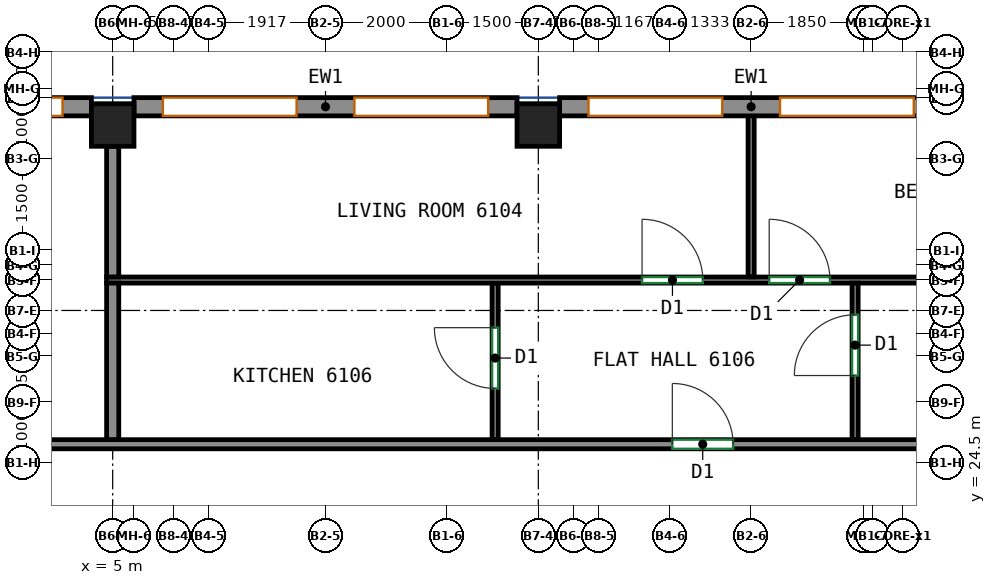
"""IFC4 building model, lengths in metres.
Left out: names, types, materials, properties, quantities, classifications, styles, units other than length and angle.
Written with IfcOpenShell. Run it as: python <this file> out.ifc"""

import sys

from ifc_helpers import new_model, si_unit, direction, frame, frame_2d, origin, origin_2d, place, context, subcontext, project, spatial, rectangle, extrude, source, transform, mapped, element, fill, save


model = new_model("IFC4")
c1 = context("Model", 3, precision=1e-05, world=origin(), true_north=direction((0.0, 1.0)))
c2 = subcontext(c1, "Body", "Model", "MODEL_VIEW")
j1 = project(units=[si_unit("LENGTHUNIT", "METRE"), si_unit("PLANEANGLEUNIT", "RADIAN")], contexts=[c1])
p1 = place(None, origin())
s1 = spatial("IfcSite", under=j1, at=p1, CompositionType="ELEMENT")
p2 = place(p1, origin())
s2 = spatial("IfcBuilding", under=s1, at=p2, CompositionType="ELEMENT")
p3 = place(p2, frame((0.0, 0.0, 252.6)))
s3 = spatial("IfcBuildingStorey", under=s2, at=p3, CompositionType="ELEMENT", Elevation=252.6)
m1 = source(origin(), c2, "Body", "SweptSolid", [
    extrude(rectangle(XDim=0.7, YDim=0.7, at=origin_2d()), origin(), (0.0, 0.0, 1.0), 3.12),
])
for number, where, z_axis, x_axis in (
    (1, (5.0, 30.05, 0.0), (0.0, 0.0, 1.0), (1.0, 0.0, 0.0)),
    (2, (12.0, 30.05, 0.0), (0.0, 0.0, 1.0), (1.0, 0.0, 0.0)),
):
    element("IfcColumn", number, at=place(p3, frame(where, z_axis=z_axis, x_axis=x_axis)), inside=s3, PredefinedType="COLUMN", context=c2, shape_type="MappedRepresentation", body=[
        mapped(m1, transform((0.0, 0.0, 0.0))),
    ])
m2 = source(origin(), c2, "Body", "SweptSolid", [
    extrude(rectangle(XDim=6.3, YDim=0.3, at=frame_2d((3.15, 0.0))), origin(), (0.0, 0.0, 1.0), 3.12),
])
p4 = place(p3, frame((18.65, 30.35, 0.0), z_axis=(0.0, 0.0, 1.0), x_axis=(-1.0, 0.0, 0.0)))
e3 = element("IfcWall", 3, at=p4, inside=s3, PredefinedType="SOLIDWALL", context=c2, shape_type="MappedRepresentation", body=[
    mapped(m2, transform((0.0, 0.0, 0.0))),
])
p5 = place(p4, frame((0.475, 0.0, 0.8)))
e4 = element("IfcOpeningElement", 4, at=p5, cuts=e3, PredefinedType="OPENING", context=c2, shape_type="SweptSolid", body=[
    extrude(rectangle(XDim=2.2, YDim=2.05, at=frame_2d((1.1, 1.025))), frame((0.0, 0.16, 0.0), z_axis=(0.0, -1.0, 0.0), x_axis=(1.0, 0.0, 0.0)), (0.0, 0.0, 1.0), 0.32),
])
p6 = place(p4, frame((3.625, 0.0, 0.8)))
e5 = element("IfcOpeningElement", 5, at=p6, cuts=e3, PredefinedType="OPENING", context=c2, shape_type="SweptSolid", body=[
    extrude(rectangle(XDim=2.2, YDim=2.05, at=frame_2d((1.1, 1.025))), frame((0.0, 0.16, 0.0), z_axis=(0.0, -1.0, 0.0), x_axis=(1.0, 0.0, 0.0)), (0.0, 0.0, 1.0), 0.32),
])
p7 = place(p3, frame((11.65, 30.35, 0.0), z_axis=(0.0, 0.0, 1.0), x_axis=(-1.0, 0.0, 0.0)))
e6 = element("IfcWall", 6, at=p7, inside=s3, PredefinedType="SOLIDWALL", context=c2, shape_type="MappedRepresentation", body=[
    mapped(m2, transform((0.0, 0.0, 0.0))),
])
p8 = place(p7, frame((0.475, 0.0, 0.8)))
e7 = element("IfcOpeningElement", 7, at=p8, cuts=e6, PredefinedType="OPENING", context=c2, shape_type="SweptSolid", body=[
    extrude(rectangle(XDim=2.2, YDim=2.05, at=frame_2d((1.1, 1.025))), frame((0.0, 0.16, 0.0), z_axis=(0.0, -1.0, 0.0), x_axis=(1.0, 0.0, 0.0)), (0.0, 0.0, 1.0), 0.32),
])
p9 = place(p7, frame((3.625, 0.0, 0.8)))
e8 = element("IfcOpeningElement", 8, at=p9, cuts=e6, PredefinedType="OPENING", context=c2, shape_type="SweptSolid", body=[
    extrude(rectangle(XDim=2.2, YDim=2.05, at=frame_2d((1.1, 1.025))), frame((0.0, 0.16, 0.0), z_axis=(0.0, -1.0, 0.0), x_axis=(1.0, 0.0, 0.0)), (0.0, 0.0, 1.0), 0.32),
])
p10 = place(p3, frame((4.65, 30.35, 0.0), z_axis=(0.0, 0.0, 1.0), x_axis=(-1.0, 0.0, 0.0)))
e9 = element("IfcWall", 9, at=p10, inside=s3, PredefinedType="SOLIDWALL", context=c2, shape_type="MappedRepresentation", body=[
    mapped(m2, transform((0.0, 0.0, 0.0))),
])
p11 = place(p10, frame((0.475, 0.0, 0.8)))
e10 = element("IfcOpeningElement", 10, at=p11, cuts=e9, PredefinedType="OPENING", context=c2, shape_type="SweptSolid", body=[
    extrude(rectangle(XDim=2.2, YDim=2.05, at=frame_2d((1.1, 1.025))), frame((0.0, 0.16, 0.0), z_axis=(0.0, -1.0, 0.0), x_axis=(1.0, 0.0, 0.0)), (0.0, 0.0, 1.0), 0.32),
])
p12 = place(p10, frame((3.625, 0.0, 0.8)))
e11 = element("IfcOpeningElement", 11, at=p12, cuts=e9, PredefinedType="OPENING", context=c2, shape_type="SweptSolid", body=[
    extrude(rectangle(XDim=2.2, YDim=2.05, at=frame_2d((1.1, 1.025))), frame((0.0, 0.16, 0.0), z_axis=(0.0, -1.0, 0.0), x_axis=(1.0, 0.0, 0.0)), (0.0, 0.0, 1.0), 0.32),
])
p13 = place(p3, frame((-16.075, 24.8, 0.0), z_axis=(0.0, 0.0, 1.0), x_axis=(1.0, 0.0, 0.0)))
e12 = element("IfcWall", 12, at=p13, inside=s3, PredefinedType="PARTITIONING", context=c2, shape_type="SweptSolid", body=[
    extrude(rectangle(XDim=36.073, YDim=0.15, at=frame_2d((18.037, 0.0))), origin(), (0.0, 0.0, 1.0), 3.12),
])
p14 = place(p13, frame((16.771, 0.0, 0.0)))
e13 = element("IfcOpeningElement", 13, at=p14, cuts=e12, PredefinedType="OPENING", context=c2, shape_type="SweptSolid", body=[
    extrude(rectangle(XDim=0.9, YDim=2.1, at=frame_2d((0.45, 1.05))), frame((0.0, 0.085, 0.0), z_axis=(0.0, -1.0, 0.0), x_axis=(1.0, 0.0, 0.0)), (0.0, 0.0, 1.0), 0.17),
])
p15 = place(p13, frame((30.279, 0.0, 0.0)))
e14 = element("IfcOpeningElement", 14, at=p15, cuts=e12, PredefinedType="OPENING", context=c2, shape_type="SweptSolid", body=[
    extrude(rectangle(XDim=1.0, YDim=2.1, at=frame_2d((0.5, 1.05))), frame((0.0, 0.085, 0.0), z_axis=(0.0, -1.0, 0.0), x_axis=(1.0, 0.0, 0.0)), (0.0, 0.0, 1.0), 0.17),
])
p16 = place(p3, frame((11.29, 24.877, 0.0), z_axis=(0.0, 0.0, 1.0), x_axis=(0.0, 1.0, 0.0)))
e15 = element("IfcWall", 15, at=p16, inside=s3, PredefinedType="PARTITIONING", context=c2, shape_type="SweptSolid", body=[
    extrude(rectangle(XDim=2.573, YDim=0.1, at=frame_2d((1.287, 0.0))), origin(), (0.0, 0.0, 1.0), 3.12),
])
p17 = place(p16, frame((0.84, 0.0, 0.0)))
e16 = element("IfcOpeningElement", 16, at=p17, cuts=e15, PredefinedType="OPENING", context=c2, shape_type="SweptSolid", body=[
    extrude(rectangle(XDim=1.0, YDim=2.1, at=frame_2d((0.5, 1.05))), frame((0.0, 0.06, 0.0), z_axis=(0.0, -1.0, 0.0), x_axis=(1.0, 0.0, 0.0)), (0.0, 0.0, 1.0), 0.12),
])
p18 = place(p3, frame((4.9, 27.5, 0.0), z_axis=(0.0, 0.0, 1.0), x_axis=(1.0, 0.0, 0.0)))
e17 = element("IfcWall", 17, at=p18, inside=s3, PredefinedType="PARTITIONING", context=c2, shape_type="SweptSolid", body=[
    extrude(rectangle(XDim=17.798, YDim=0.1, at=frame_2d((8.899, 0.0))), origin(), (0.0, 0.0, 1.0), 3.12),
])
p19 = place(p18, frame((8.806, 0.0, 0.0)))
e18 = element("IfcOpeningElement", 18, at=p19, cuts=e17, PredefinedType="OPENING", context=c2, shape_type="SweptSolid", body=[
    extrude(rectangle(XDim=1.0, YDim=2.1, at=frame_2d((0.5, 1.05))), frame((0.0, 0.06, 0.0), z_axis=(0.0, -1.0, 0.0), x_axis=(1.0, 0.0, 0.0)), (0.0, 0.0, 1.0), 0.12),
])
p20 = place(p18, frame((10.897, 0.0, 0.0)))
e19 = element("IfcOpeningElement", 19, at=p20, cuts=e17, PredefinedType="OPENING", context=c2, shape_type="SweptSolid", body=[
    extrude(rectangle(XDim=1.0, YDim=2.1, at=frame_2d((0.5, 1.05))), frame((0.0, 0.06, 0.0), z_axis=(0.0, -1.0, 0.0), x_axis=(1.0, 0.0, 0.0)), (0.0, 0.0, 1.0), 0.12),
])
p21 = place(p3, frame((5.0, 24.877, 0.0), z_axis=(0.0, 0.0, 1.0), x_axis=(0.0, 1.0, 0.0)))
e20 = element("IfcWall", 20, at=p21, inside=s3, PredefinedType="PARTITIONING", context=c2, shape_type="SweptSolid", body=[
    extrude(rectangle(XDim=2.573, YDim=0.2, at=frame_2d((1.287, 0.0))), origin(), (0.0, 0.0, 1.0), 3.12),
])
p22 = place(p3, frame((17.21, 24.877, 0.0), z_axis=(0.0, 0.0, 1.0), x_axis=(0.0, 1.0, 0.0)))
e21 = element("IfcWall", 21, at=p22, inside=s3, PredefinedType="PARTITIONING", context=c2, shape_type="SweptSolid", body=[
    extrude(rectangle(XDim=2.573, YDim=0.1, at=frame_2d((1.287, 0.0))), origin(), (0.0, 0.0, 1.0), 3.12),
])
p23 = place(p22, frame((1.053, 0.0, 0.0)))
e22 = element("IfcOpeningElement", 22, at=p23, cuts=e21, PredefinedType="OPENING", context=c2, shape_type="SweptSolid", body=[
    extrude(rectangle(XDim=1.0, YDim=2.1, at=frame_2d((0.5, 1.05))), frame((0.0, 0.06, 0.0), z_axis=(0.0, -1.0, 0.0), x_axis=(1.0, 0.0, 0.0)), (0.0, 0.0, 1.0), 0.12),
])
p24 = place(p3, frame((15.5, 27.552, 0.0), z_axis=(0.0, 0.0, 1.0), x_axis=(0.0, 1.0, 0.0)))
e23 = element("IfcWall", 23, at=p24, inside=s3, PredefinedType="PARTITIONING", context=c2, shape_type="SweptSolid", body=[
    extrude(rectangle(XDim=2.698, YDim=0.1, at=frame_2d((1.349, 0.0))), origin(), (0.0, 0.0, 1.0), 3.12),
])
p25 = place(p3, frame((5.0, 27.552, 0.0), z_axis=(0.0, 0.0, 1.0), x_axis=(0.0, 1.0, 0.0)))
e24 = element("IfcWall", 24, at=p25, inside=s3, PredefinedType="PARTITIONING", context=c2, shape_type="SweptSolid", body=[
    extrude(rectangle(XDim=2.148, YDim=0.2, at=frame_2d((1.074, 0.0))), origin(), (0.0, 0.0, 1.0), 3.12),
])
p26 = place(p5, origin())
e25 = element("IfcWindow", 25, at=p26, inside=s3, PartitioningType="SINGLE_PANEL", PredefinedType="WINDOW", context=c2, shape_type="SweptSolid", body=[
    extrude(rectangle(XDim=2.2, YDim=2.05, at=frame_2d((1.1, 1.025))), frame((0.0, 0.03, 0.0), z_axis=(0.0, -1.0, 0.0), x_axis=(1.0, 0.0, 0.0)), (0.0, 0.0, 1.0), 0.06),
])
fill(e4, e25)
p27 = place(p6, origin())
e26 = element("IfcWindow", 26, at=p27, inside=s3, PartitioningType="SINGLE_PANEL", PredefinedType="WINDOW", context=c2, shape_type="SweptSolid", body=[
    extrude(rectangle(XDim=2.2, YDim=2.05, at=frame_2d((1.1, 1.025))), frame((0.0, 0.03, 0.0), z_axis=(0.0, -1.0, 0.0), x_axis=(1.0, 0.0, 0.0)), (0.0, 0.0, 1.0), 0.06),
])
fill(e5, e26)
p28 = place(p8, origin())
e27 = element("IfcWindow", 27, at=p28, inside=s3, PartitioningType="SINGLE_PANEL", PredefinedType="WINDOW", context=c2, shape_type="SweptSolid", body=[
    extrude(rectangle(XDim=2.2, YDim=2.05, at=frame_2d((1.1, 1.025))), frame((0.0, 0.03, 0.0), z_axis=(0.0, -1.0, 0.0), x_axis=(1.0, 0.0, 0.0)), (0.0, 0.0, 1.0), 0.06),
])
fill(e7, e27)
p29 = place(p9, origin())
e28 = element("IfcWindow", 28, at=p29, inside=s3, PartitioningType="SINGLE_PANEL", PredefinedType="WINDOW", context=c2, shape_type="SweptSolid", body=[
    extrude(rectangle(XDim=2.2, YDim=2.05, at=frame_2d((1.1, 1.025))), frame((0.0, 0.03, 0.0), z_axis=(0.0, -1.0, 0.0), x_axis=(1.0, 0.0, 0.0)), (0.0, 0.0, 1.0), 0.06),
])
fill(e8, e28)
p30 = place(p11, origin())
e29 = element("IfcWindow", 29, at=p30, inside=s3, PartitioningType="SINGLE_PANEL", PredefinedType="WINDOW", context=c2, shape_type="SweptSolid", body=[
    extrude(rectangle(XDim=2.2, YDim=2.05, at=frame_2d((1.1, 1.025))), frame((0.0, 0.03, 0.0), z_axis=(0.0, -1.0, 0.0), x_axis=(1.0, 0.0, 0.0)), (0.0, 0.0, 1.0), 0.06),
])
fill(e10, e29)
p31 = place(p15, origin())
e30 = element("IfcDoor", 30, at=p31, inside=s3, OperationType="SINGLE_SWING_LEFT", PredefinedType="DOOR", context=c2, shape_type="SweptSolid", body=[
    extrude(rectangle(XDim=1.0, YDim=2.1, at=frame_2d((0.5, 1.05))), frame((0.0, 0.025, 0.0), z_axis=(0.0, -1.0, 0.0), x_axis=(1.0, 0.0, 0.0)), (0.0, 0.0, 1.0), 0.05),
])
fill(e14, e30)
p32 = place(p17, origin())
e31 = element("IfcDoor", 31, at=p32, inside=s3, OperationType="SINGLE_SWING_RIGHT", PredefinedType="DOOR", context=c2, shape_type="SweptSolid", body=[
    extrude(rectangle(XDim=1.0, YDim=2.1, at=frame_2d((0.5, 1.05))), frame((0.0, 0.025, 0.0), z_axis=(0.0, -1.0, 0.0), x_axis=(1.0, 0.0, 0.0)), (0.0, 0.0, 1.0), 0.05),
])
fill(e16, e31)
p33 = place(p23, origin())
e32 = element("IfcDoor", 32, at=p33, inside=s3, OperationType="SINGLE_SWING_LEFT", PredefinedType="DOOR", context=c2, shape_type="SweptSolid", body=[
    extrude(rectangle(XDim=1.0, YDim=2.1, at=frame_2d((0.5, 1.05))), frame((0.0, 0.025, 0.0), z_axis=(0.0, -1.0, 0.0), x_axis=(1.0, 0.0, 0.0)), (0.0, 0.0, 1.0), 0.05),
])
fill(e22, e32)
p34 = place(p19, origin())
e33 = element("IfcDoor", 33, at=p34, inside=s3, OperationType="SINGLE_SWING_LEFT", PredefinedType="DOOR", context=c2, shape_type="SweptSolid", body=[
    extrude(rectangle(XDim=1.0, YDim=2.1, at=frame_2d((0.5, 1.05))), frame((0.0, 0.025, 0.0), z_axis=(0.0, -1.0, 0.0), x_axis=(1.0, 0.0, 0.0)), (0.0, 0.0, 1.0), 0.05),
])
fill(e18, e33)
p35 = place(p20, origin())
e34 = element("IfcDoor", 34, at=p35, inside=s3, OperationType="SINGLE_SWING_LEFT", PredefinedType="DOOR", context=c2, shape_type="SweptSolid", body=[
    extrude(rectangle(XDim=1.0, YDim=2.1, at=frame_2d((0.5, 1.05))), frame((0.0, 0.025, 0.0), z_axis=(0.0, -1.0, 0.0), x_axis=(1.0, 0.0, 0.0)), (0.0, 0.0, 1.0), 0.05),
])
fill(e19, e34)
save(model, sys.argv[1])
